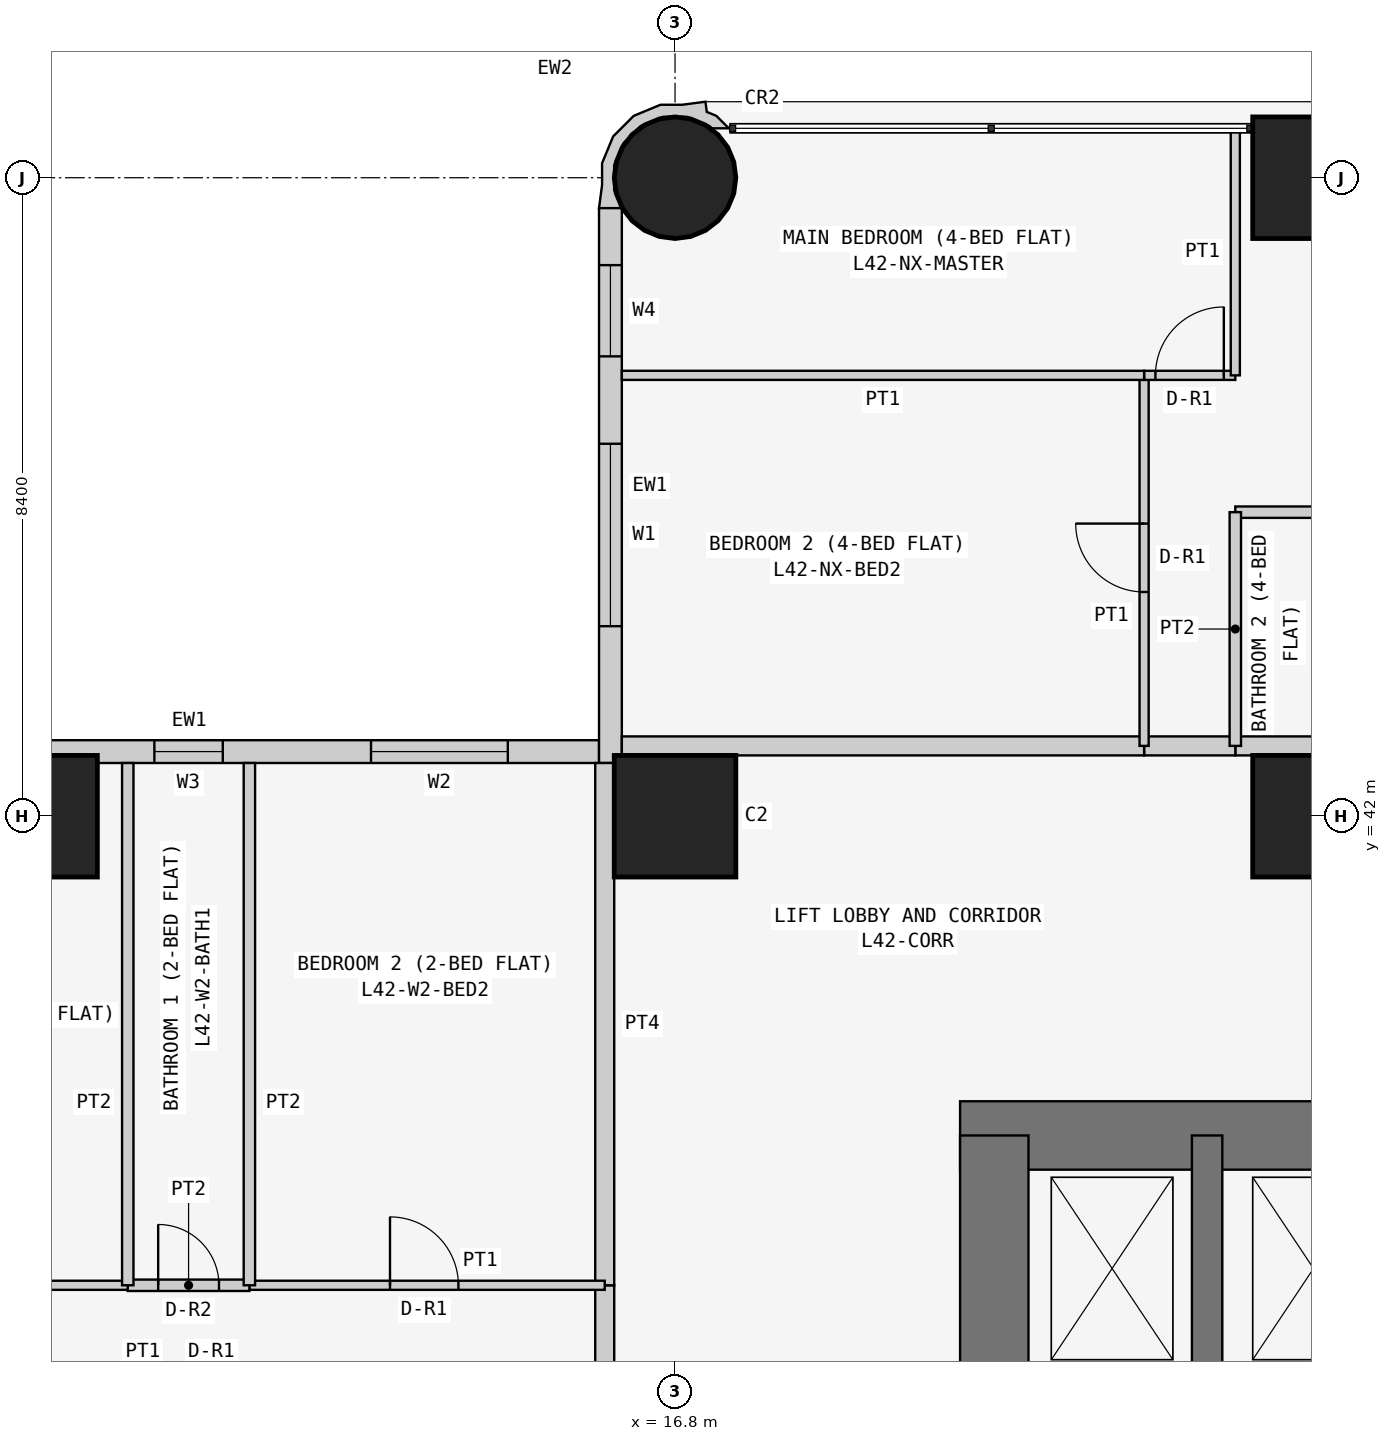
"""IFC4 building model, lengths in metres.
Left out: names, types, materials, properties, quantities, classifications, styles, units other than length and angle.
Written with IfcOpenShell. Run it as: python <this file> out.ifc"""

import sys

from ifc_helpers import new_model, si_unit, direction, frame, frame_2d, origin, origin_2d, place, context, subcontext, project, spatial, polyline, rectangle, circle, outline, extrude, element, fill, save


model = new_model("IFC4")
c1 = context("Model", 3, precision=1e-05, world=origin(), true_north=direction((0.0, 1.0)))
c2 = subcontext(c1, "Body", "Model", "MODEL_VIEW")
j1 = project(units=[si_unit("LENGTHUNIT", "METRE"), si_unit("PLANEANGLEUNIT", "RADIAN")], contexts=[c1])
p1 = place(None, origin())
s1 = spatial("IfcSite", under=j1, at=p1, CompositionType="ELEMENT")
p2 = place(p1, origin())
s2 = spatial("IfcBuilding", under=s1, at=p2, CompositionType="ELEMENT")
p3 = place(p2, frame((0.0, 0.0, 162.9)))
s3 = spatial("IfcBuildingStorey", under=s2, at=p3, CompositionType="ELEMENT", Elevation=162.9)
for number, where, z_axis, x_axis in (
    (1, (8.4, 42.0, 0.0), (0.0, 0.0, 1.0), (1.0, 0.0, 0.0)),
    (2, (16.8, 42.0, 0.0), (0.0, 0.0, 1.0), (1.0, 0.0, 0.0)),
):
    element("IfcColumn", number, at=place(p3, frame(where, z_axis=z_axis, x_axis=x_axis)), inside=s3, PredefinedType="COLUMN", context=c2, shape_type="SweptSolid", body=[
        extrude(rectangle(XDim=1.6, YDim=1.6, at=origin_2d()), origin(), (0.0, 0.0, 1.0), 3.6),
    ])
p4 = place(p3, frame((16.8, 50.4, 0.0), z_axis=(0.0, 0.0, 1.0), x_axis=(1.0, 0.0, 0.0)))
e3 = element("IfcColumn", 3, at=p4, inside=s3, PredefinedType="COLUMN", context=c2, shape_type="SweptSolid", body=[
    extrude(circle(Radius=0.8, at=origin_2d()), origin(), (0.0, 0.0, 1.0), 3.6),
])
for number, where, z_axis, x_axis in (
    (4, (25.2, 42.0, 0.0), (0.0, 0.0, 1.0), (1.0, 0.0, 0.0)),
    (5, (25.2, 50.4, 0.0), (0.0, 0.0, 1.0), (1.0, 0.0, 0.0)),
):
    element("IfcColumn", number, at=place(p3, frame(where, z_axis=z_axis, x_axis=x_axis)), inside=s3, PredefinedType="COLUMN", context=c2, shape_type="SweptSolid", body=[
        extrude(rectangle(XDim=1.6, YDim=1.6, at=origin_2d()), origin(), (0.0, 0.0, 1.0), 3.6),
    ])
p5 = place(p3, frame((37.8, 37.8, 0.0), z_axis=(0.0, 0.0, 1.0), x_axis=(-1.0, 0.0, 0.0)))
e6 = element("IfcWall", 6, at=p5, inside=s3, PredefinedType="SHEAR", context=c2, shape_type="SweptSolid", body=[
    extrude(rectangle(XDim=17.25, YDim=0.9, at=frame_2d((8.625, 0.0))), origin(), (0.0, 0.0, 1.0), 3.6),
])
p6 = place(p3, frame((21.0, 37.8, 0.0), z_axis=(0.0, 0.0, 1.0), x_axis=(0.0, -1.0, 0.0)))
e7 = element("IfcWall", 7, at=p6, inside=s3, PredefinedType="SHEAR", context=c2, shape_type="SweptSolid", body=[
    extrude(rectangle(XDim=17.25, YDim=0.9, at=frame_2d((8.625, 0.0))), origin(), (0.0, 0.0, 1.0), 3.6),
])
p7 = place(p6, frame((5.4, 0.0, 0.0)))
e8 = element("IfcOpeningElement", 8, at=p7, cuts=e7, PredefinedType="OPENING", context=c2, shape_type="SweptSolid", body=[
    extrude(rectangle(XDim=1.2, YDim=2.1, at=frame_2d((0.6, 1.05))), frame((0.0, 0.46, 0.0), z_axis=(0.0, -1.0, 0.0), x_axis=(1.0, 0.0, 0.0)), (0.0, 0.0, 1.0), 0.92),
])
p8 = place(p3, frame((23.8, 34.6, 0.0), z_axis=(0.0, 0.0, 1.0), x_axis=(0.0, 1.0, 0.0)))
e9 = element("IfcWall", 9, at=p8, inside=s3, PredefinedType="SHEAR", context=c2, shape_type="SweptSolid", body=[
    extrude(rectangle(XDim=3.2, YDim=0.4, at=frame_2d((1.6, 0.0))), origin(), (0.0, 0.0, 1.0), 3.6),
])
p9 = place(p3, frame((15.8, 42.85, 0.0), z_axis=(0.0, 0.0, 1.0), x_axis=(-1.0, 0.0, 0.0)))
e10 = element("IfcWall", 10, at=p9, inside=s3, PredefinedType="SOLIDWALL", context=c2, shape_type="SweptSolid", body=[
    extrude(rectangle(XDim=15.4, YDim=0.3, at=frame_2d((7.7, 0.0))), origin(), (0.0, 0.0, 1.0), 3.45),
])
p10 = place(p9, frame((1.2, 0.0, 0.9)))
e11 = element("IfcOpeningElement", 11, at=p10, cuts=e10, PredefinedType="OPENING", context=c2, shape_type="SweptSolid", body=[
    extrude(rectangle(XDim=1.8, YDim=1.5, at=frame_2d((0.9, 0.75))), frame((0.0, 0.16, 0.0), z_axis=(0.0, -1.0, 0.0), x_axis=(1.0, 0.0, 0.0)), (0.0, 0.0, 1.0), 0.32),
])
p11 = place(p9, frame((4.95, 0.0, 1.5)))
e12 = element("IfcOpeningElement", 12, at=p11, cuts=e10, PredefinedType="OPENING", context=c2, shape_type="SweptSolid", body=[
    extrude(rectangle(XDim=0.9, YDim=0.7, at=frame_2d((0.45, 0.35))), frame((0.0, 0.16, 0.0), z_axis=(0.0, -1.0, 0.0), x_axis=(1.0, 0.0, 0.0)), (0.0, 0.0, 1.0), 0.32),
])
p12 = place(p9, frame((8.5, 0.0, 0.9)))
e13 = element("IfcOpeningElement", 13, at=p12, cuts=e10, PredefinedType="OPENING", context=c2, shape_type="SweptSolid", body=[
    extrude(rectangle(XDim=1.8, YDim=1.5, at=frame_2d((0.9, 0.75))), frame((0.0, 0.16, 0.0), z_axis=(0.0, -1.0, 0.0), x_axis=(1.0, 0.0, 0.0)), (0.0, 0.0, 1.0), 0.32),
])
p13 = place(p9, frame((12.5, 0.0, 0.0)))
e14 = element("IfcOpeningElement", 14, at=p13, cuts=e10, PredefinedType="OPENING", context=c2, shape_type="SweptSolid", body=[
    extrude(rectangle(XDim=0.9, YDim=2.4, at=frame_2d((0.45, 1.2))), frame((0.0, 0.16, 0.0), z_axis=(0.0, -1.0, 0.0), x_axis=(1.0, 0.0, 0.0)), (0.0, 0.0, 1.0), 0.32),
])
p14 = place(p9, frame((13.5, 0.0, 0.9)))
e15 = element("IfcOpeningElement", 15, at=p14, cuts=e10, PredefinedType="OPENING", context=c2, shape_type="SweptSolid", body=[
    extrude(rectangle(XDim=1.2, YDim=1.5, at=frame_2d((0.6, 0.75))), frame((0.0, 0.16, 0.0), z_axis=(0.0, -1.0, 0.0), x_axis=(1.0, 0.0, 0.0)), (0.0, 0.0, 1.0), 0.32),
])
p15 = place(p3, frame((15.95, 50.0, 0.0), z_axis=(0.0, 0.0, 1.0), x_axis=(0.0, -1.0, 0.0)))
e16 = element("IfcWall", 16, at=p15, inside=s3, PredefinedType="SOLIDWALL", context=c2, shape_type="SweptSolid", body=[
    extrude(rectangle(XDim=7.3, YDim=0.3, at=frame_2d((3.65, 0.0))), origin(), (0.0, 0.0, 1.0), 3.45),
])
p16 = place(p15, frame((3.1, 0.0, 0.9)))
e17 = element("IfcOpeningElement", 17, at=p16, cuts=e16, PredefinedType="OPENING", context=c2, shape_type="SweptSolid", body=[
    extrude(rectangle(XDim=2.4, YDim=1.5, at=frame_2d((1.2, 0.75))), frame((0.0, 0.16, 0.0), z_axis=(0.0, -1.0, 0.0), x_axis=(1.0, 0.0, 0.0)), (0.0, 0.0, 1.0), 0.32),
])
p17 = place(p15, frame((0.75, 0.0, 0.9)))
e18 = element("IfcOpeningElement", 18, at=p17, cuts=e16, PredefinedType="OPENING", context=c2, shape_type="SweptSolid", body=[
    extrude(rectangle(XDim=1.2, YDim=1.5, at=frame_2d((0.6, 0.75))), frame((0.0, 0.16, 0.0), z_axis=(0.0, -1.0, 0.0), x_axis=(1.0, 0.0, 0.0)), (0.0, 0.0, 1.0), 0.32),
])
p18 = place(p3, frame((17.448, 50.995, 0.0), z_axis=(0.0, 0.0, 1.0), x_axis=(-0.343276641956, 0.93923434088, 0.0)))
e19 = element("IfcWall", 19, at=p18, inside=s3, PredefinedType="SOLIDWALL", context=c2, shape_type="SweptSolid", body=[
    extrude(outline(polyline([(0.241, 0.023), (0.333, 0.124), (0.465, 0.094), (0.532, 0.393), (0.631, 0.663), (0.614, 1.045), (0.454, 1.391), (0.172, 1.649), (-0.098, 1.748), (-0.369, 1.89), (-0.509, 1.621), (-0.491, 1.615), (-0.479, 1.609), (-0.211, 1.62), (0.088, 1.511), (0.323, 1.295), (0.457, 1.006), (0.47, 0.688), (0.361, 0.389), (0.145, 0.154), (0.108, 0.137), (0.031, -0.075), (0.241, 0.023)])), origin(), (0.0, 0.0, 1.0), 3.45),
])
p19 = place(p3, frame((24.171, 42.925, 0.0), z_axis=(0.0, 0.0, 1.0), x_axis=(1.0, 0.0, 0.0)))
e20 = element("IfcWall", 20, at=p19, inside=s3, PredefinedType="PARTITIONING", context=c2, shape_type="SweptSolid", body=[
    extrude(rectangle(XDim=2.629, YDim=0.25, at=frame_2d((1.314, 0.0))), origin(), (0.0, 0.0, 1.0), 3.45),
])
p20 = place(p3, frame((22.971, 42.925, 0.0), z_axis=(0.0, 0.0, 1.0), x_axis=(1.0, 0.0, 0.0)))
e21 = element("IfcWall", 21, at=p20, inside=s3, PredefinedType="PARTITIONING", context=c2, shape_type="SweptSolid", body=[
    extrude(rectangle(XDim=1.2, YDim=0.25, at=frame_2d((0.6, 0.0))), origin(), (0.0, 0.0, 1.0), 3.45),
])
p21 = place(p3, frame((16.1, 42.925, 0.0), z_axis=(0.0, 0.0, 1.0), x_axis=(1.0, 0.0, 0.0)))
e22 = element("IfcWall", 22, at=p21, inside=s3, PredefinedType="PARTITIONING", context=c2, shape_type="SweptSolid", body=[
    extrude(rectangle(XDim=6.871, YDim=0.25, at=frame_2d((3.436, 0.0))), origin(), (0.0, 0.0, 1.0), 3.45),
])
p22 = place(p3, frame((15.875, 34.629, 0.0), z_axis=(0.0, 0.0, 1.0), x_axis=(0.0, 1.0, 0.0)))
e23 = element("IfcWall", 23, at=p22, inside=s3, PredefinedType="PARTITIONING", context=c2, shape_type="SweptSolid", body=[
    extrude(rectangle(XDim=1.2, YDim=0.25, at=frame_2d((0.6, 0.0))), origin(), (0.0, 0.0, 1.0), 3.45),
])
p23 = place(p3, frame((15.875, 35.829, 0.0), z_axis=(0.0, 0.0, 1.0), x_axis=(0.0, 1.0, 0.0)))
e24 = element("IfcWall", 24, at=p23, inside=s3, PredefinedType="PARTITIONING", context=c2, shape_type="SweptSolid", body=[
    extrude(rectangle(XDim=6.871, YDim=0.25, at=frame_2d((3.436, 0.0))), origin(), (0.0, 0.0, 1.0), 3.45),
])
p24 = place(p3, frame((26.8, 46.0, 0.0), z_axis=(0.0, 0.0, 1.0), x_axis=(-1.0, 0.0, 0.0)))
e25 = element("IfcWall", 25, at=p24, inside=s3, PredefinedType="PARTITIONING", context=c2, shape_type="SweptSolid", body=[
    extrude(rectangle(XDim=2.629, YDim=0.15, at=frame_2d((1.314, 0.0))), origin(), (0.0, 0.0, 1.0), 3.45),
])
p25 = place(p3, frame((24.171, 46.0, 0.0), z_axis=(0.0, 0.0, 1.0), x_axis=(0.0, -1.0, 0.0)))
e26 = element("IfcWall", 26, at=p25, inside=s3, PredefinedType="PARTITIONING", context=c2, shape_type="SweptSolid", body=[
    extrude(rectangle(XDim=3.075, YDim=0.15, at=frame_2d((1.538, 0.0))), origin(), (0.0, 0.0, 1.0), 3.45),
])
p26 = place(p3, frame((22.971, 42.925, 0.0), z_axis=(0.0, 0.0, 1.0), x_axis=(0.0, 1.0, 0.0)))
e27 = element("IfcWall", 27, at=p26, inside=s3, PredefinedType="PARTITIONING", context=c2, shape_type="SweptSolid", body=[
    extrude(rectangle(XDim=4.875, YDim=0.12, at=frame_2d((2.438, 0.0))), origin(), (0.0, 0.0, 1.0), 3.45),
])
p27 = place(p26, frame((2.025, 0.0, 0.0)))
e28 = element("IfcOpeningElement", 28, at=p27, cuts=e27, PredefinedType="OPENING", context=c2, shape_type="SweptSolid", body=[
    extrude(rectangle(XDim=0.9, YDim=2.1, at=frame_2d((0.45, 1.05))), frame((0.0, 0.07, 0.0), z_axis=(0.0, -1.0, 0.0), x_axis=(1.0, 0.0, 0.0)), (0.0, 0.0, 1.0), 0.14),
])
p28 = place(p3, frame((22.971, 47.8, 0.0), z_axis=(0.0, 0.0, 1.0), x_axis=(1.0, 0.0, 0.0)))
e29 = element("IfcWall", 29, at=p28, inside=s3, PredefinedType="PARTITIONING", context=c2, shape_type="SweptSolid", body=[
    extrude(rectangle(XDim=1.2, YDim=0.12, at=frame_2d((0.6, 0.0))), origin(), (0.0, 0.0, 1.0), 3.45),
])
p29 = place(p28, frame((0.149, 0.0, 0.0)))
e30 = element("IfcOpeningElement", 30, at=p29, cuts=e29, PredefinedType="OPENING", context=c2, shape_type="SweptSolid", body=[
    extrude(rectangle(XDim=0.9, YDim=2.1, at=frame_2d((0.45, 1.05))), frame((0.0, 0.07, 0.0), z_axis=(0.0, -1.0, 0.0), x_axis=(1.0, 0.0, 0.0)), (0.0, 0.0, 1.0), 0.14),
])
p30 = place(p3, frame((24.171, 47.8, 0.0), z_axis=(0.0, 0.0, 1.0), x_axis=(0.0, 1.0, 0.0)))
e31 = element("IfcWall", 31, at=p30, inside=s3, PredefinedType="PARTITIONING", context=c2, shape_type="SweptSolid", body=[
    extrude(rectangle(XDim=3.25, YDim=0.12, at=frame_2d((1.625, 0.0))), origin(), (0.0, 0.0, 1.0), 3.45),
])
p31 = place(p3, frame((22.971, 47.8, 0.0), z_axis=(0.0, 0.0, 1.0), x_axis=(-1.0, 0.0, 0.0)))
e32 = element("IfcWall", 32, at=p31, inside=s3, PredefinedType="PARTITIONING", context=c2, shape_type="SweptSolid", body=[
    extrude(rectangle(XDim=6.871, YDim=0.12, at=frame_2d((3.436, 0.0))), origin(), (0.0, 0.0, 1.0), 3.45),
])
p32 = place(p3, frame((11.2, 35.829, 0.0), z_axis=(0.0, 0.0, 1.0), x_axis=(1.0, 0.0, 0.0)))
e33 = element("IfcWall", 33, at=p32, inside=s3, PredefinedType="PARTITIONING", context=c2, shape_type="SweptSolid", body=[
    extrude(rectangle(XDim=4.675, YDim=0.12, at=frame_2d((2.337, 0.0))), origin(), (0.0, 0.0, 1.0), 3.45),
])
p33 = place(p32, frame((1.85, 0.0, 0.0)))
e34 = element("IfcOpeningElement", 34, at=p33, cuts=e33, PredefinedType="OPENING", context=c2, shape_type="SweptSolid", body=[
    extrude(rectangle(XDim=0.9, YDim=2.1, at=frame_2d((0.45, 1.05))), frame((0.0, 0.07, 0.0), z_axis=(0.0, -1.0, 0.0), x_axis=(1.0, 0.0, 0.0)), (0.0, 0.0, 1.0), 0.14),
])
p34 = place(p3, frame((9.6, 35.829, 0.0), z_axis=(0.0, 0.0, 1.0), x_axis=(1.0, 0.0, 0.0)))
e35 = element("IfcWall", 35, at=p34, inside=s3, PredefinedType="PARTITIONING", context=c2, shape_type="SweptSolid", body=[
    extrude(rectangle(XDim=1.6, YDim=0.15, at=frame_2d((0.8, 0.0))), origin(), (0.0, 0.0, 1.0), 3.45),
])
p35 = place(p34, frame((0.4, 0.0, 0.0)))
e36 = element("IfcOpeningElement", 36, at=p35, cuts=e35, PredefinedType="OPENING", context=c2, shape_type="SweptSolid", body=[
    extrude(rectangle(XDim=0.8, YDim=2.1, at=frame_2d((0.4, 1.05))), frame((0.0, 0.085, 0.0), z_axis=(0.0, -1.0, 0.0), x_axis=(1.0, 0.0, 0.0)), (0.0, 0.0, 1.0), 0.17),
])
p36 = place(p3, frame((5.8, 35.829, 0.0), z_axis=(0.0, 0.0, 1.0), x_axis=(1.0, 0.0, 0.0)))
e37 = element("IfcWall", 37, at=p36, inside=s3, PredefinedType="PARTITIONING", context=c2, shape_type="SweptSolid", body=[
    extrude(rectangle(XDim=3.8, YDim=0.12, at=frame_2d((1.9, 0.0))), origin(), (0.0, 0.0, 1.0), 3.45),
])
p37 = place(p36, frame((0.55, 0.0, 0.0)))
e38 = element("IfcOpeningElement", 38, at=p37, cuts=e37, PredefinedType="OPENING", context=c2, shape_type="SweptSolid", body=[
    extrude(rectangle(XDim=0.9, YDim=2.1, at=frame_2d((0.45, 1.05))), frame((0.0, 0.07, 0.0), z_axis=(0.0, -1.0, 0.0), x_axis=(1.0, 0.0, 0.0)), (0.0, 0.0, 1.0), 0.14),
])
for number, where, z_axis, x_axis in (
    (39, (11.2, 35.829, 0.0), (0.0, 0.0, 1.0), (0.0, 1.0, 0.0)),
    (40, (9.6, 35.829, 0.0), (0.0, 0.0, 1.0), (0.0, 1.0, 0.0)),
):
    element("IfcWall", number, at=place(p3, frame(where, z_axis=z_axis, x_axis=x_axis)), inside=s3, PredefinedType="PARTITIONING", context=c2, shape_type="SweptSolid", body=[
        extrude(rectangle(XDim=6.871, YDim=0.15, at=frame_2d((3.436, 0.0))), origin(), (0.0, 0.0, 1.0), 3.45),
    ])
p38 = place(p16, origin())
e41 = element("IfcWindow", 41, at=p38, inside=s3, PartitioningType="SINGLE_PANEL", PredefinedType="WINDOW", context=c2, shape_type="SweptSolid", body=[
    extrude(rectangle(XDim=2.4, YDim=1.5, at=frame_2d((1.2, 0.75))), frame((0.0, 0.03, 0.0), z_axis=(0.0, -1.0, 0.0), x_axis=(1.0, 0.0, 0.0)), (0.0, 0.0, 1.0), 0.06),
])
fill(e17, e41)
p39 = place(p17, origin())
e42 = element("IfcWindow", 42, at=p39, inside=s3, PartitioningType="SINGLE_PANEL", PredefinedType="WINDOW", context=c2, shape_type="SweptSolid", body=[
    extrude(rectangle(XDim=1.2, YDim=1.5, at=frame_2d((0.6, 0.75))), frame((0.0, 0.03, 0.0), z_axis=(0.0, -1.0, 0.0), x_axis=(1.0, 0.0, 0.0)), (0.0, 0.0, 1.0), 0.06),
])
fill(e18, e42)
p40 = place(p10, origin())
e43 = element("IfcWindow", 43, at=p40, inside=s3, PartitioningType="SINGLE_PANEL", PredefinedType="WINDOW", context=c2, shape_type="SweptSolid", body=[
    extrude(rectangle(XDim=1.8, YDim=1.5, at=frame_2d((0.9, 0.75))), frame((0.0, 0.03, 0.0), z_axis=(0.0, -1.0, 0.0), x_axis=(1.0, 0.0, 0.0)), (0.0, 0.0, 1.0), 0.06),
])
fill(e11, e43)
p41 = place(p11, origin())
e44 = element("IfcWindow", 44, at=p41, inside=s3, PartitioningType="SINGLE_PANEL", PredefinedType="WINDOW", context=c2, shape_type="SweptSolid", body=[
    extrude(rectangle(XDim=0.9, YDim=0.7, at=frame_2d((0.45, 0.35))), frame((0.0, 0.03, 0.0), z_axis=(0.0, -1.0, 0.0), x_axis=(1.0, 0.0, 0.0)), (0.0, 0.0, 1.0), 0.06),
])
fill(e12, e44)
p42 = place(p27, origin())
e45 = element("IfcDoor", 45, at=p42, inside=s3, OperationType="SINGLE_SWING_RIGHT", PredefinedType="DOOR", context=c2, shape_type="SweptSolid", body=[
    extrude(rectangle(XDim=0.9, YDim=2.1, at=frame_2d((0.45, 1.05))), frame((0.0, 0.025, 0.0), z_axis=(0.0, -1.0, 0.0), x_axis=(1.0, 0.0, 0.0)), (0.0, 0.0, 1.0), 0.05),
])
fill(e28, e45)
p43 = place(p29, origin())
e46 = element("IfcDoor", 46, at=p43, inside=s3, OperationType="SINGLE_SWING_RIGHT", PredefinedType="DOOR", context=c2, shape_type="SweptSolid", body=[
    extrude(rectangle(XDim=0.9, YDim=2.1, at=frame_2d((0.45, 1.05))), frame((0.0, 0.025, 0.0), z_axis=(0.0, -1.0, 0.0), x_axis=(1.0, 0.0, 0.0)), (0.0, 0.0, 1.0), 0.05),
])
fill(e30, e46)
p44 = place(p33, origin())
e47 = element("IfcDoor", 47, at=p44, inside=s3, OperationType="SINGLE_SWING_LEFT", PredefinedType="DOOR", context=c2, shape_type="SweptSolid", body=[
    extrude(rectangle(XDim=0.9, YDim=2.1, at=frame_2d((0.45, 1.05))), frame((0.0, 0.025, 0.0), z_axis=(0.0, -1.0, 0.0), x_axis=(1.0, 0.0, 0.0)), (0.0, 0.0, 1.0), 0.05),
])
fill(e34, e47)
p45 = place(p35, origin())
e48 = element("IfcDoor", 48, at=p45, inside=s3, OperationType="SINGLE_SWING_LEFT", PredefinedType="DOOR", context=c2, shape_type="SweptSolid", body=[
    extrude(rectangle(XDim=0.8, YDim=2.1, at=frame_2d((0.4, 1.05))), frame((0.0, 0.025, 0.0), z_axis=(0.0, -1.0, 0.0), x_axis=(1.0, 0.0, 0.0)), (0.0, 0.0, 1.0), 0.05),
])
fill(e36, e48)
save(model, sys.argv[1])
